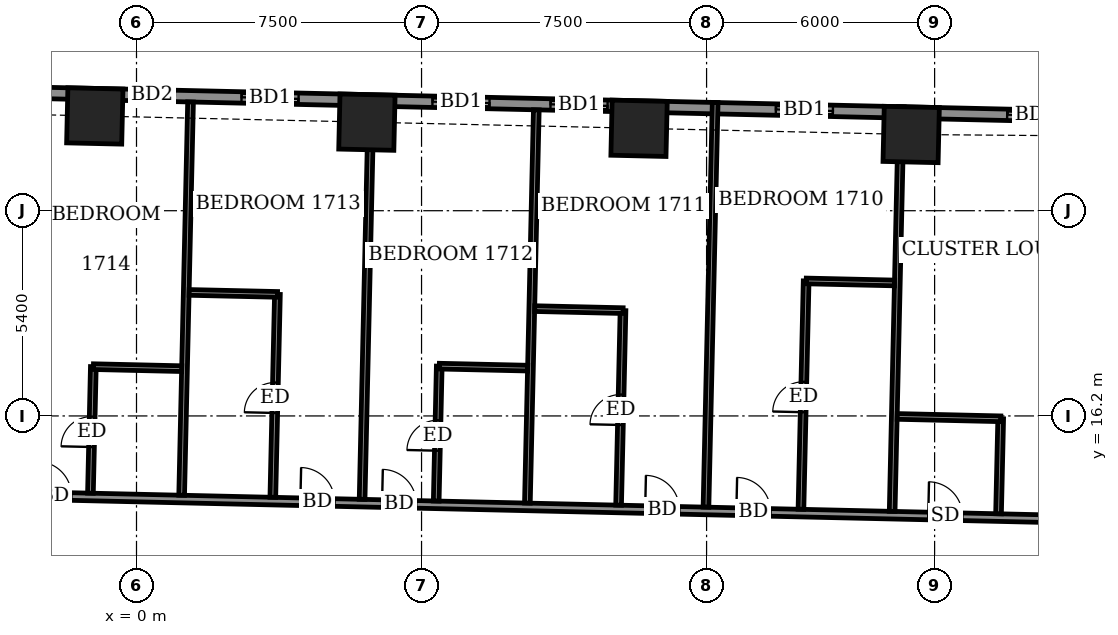
"""IFC4 building model, lengths in metres.
Left out: names, types, materials, properties, quantities, classifications, styles, units other than length and angle.
Written with IfcOpenShell. Run it as: python <this file> out.ifc"""

import sys

from ifc_helpers import new_model, si_unit, direction, frame, frame_2d, origin, origin_2d, place, context, subcontext, project, spatial, rectangle, extrude, element, fill, save


model = new_model("IFC4")
c1 = context("Model", 3, precision=1e-05, world=origin(), true_north=direction((0.0, 1.0)))
c2 = subcontext(c1, "Body", "Model", "MODEL_VIEW")
j1 = project(units=[si_unit("LENGTHUNIT", "METRE"), si_unit("PLANEANGLEUNIT", "RADIAN")], contexts=[c1])
p1 = place(None, origin())
s1 = spatial("IfcSite", under=j1, at=p1, CompositionType="ELEMENT")
p2 = place(p1, origin())
s2 = spatial("IfcBuilding", under=s1, at=p2, CompositionType="ELEMENT")
p3 = place(p2, frame((0.0, 0.0, 71.1)))
s3 = spatial("IfcBuildingStorey", under=s2, at=p3, CompositionType="ELEMENT", Elevation=71.1)
for number, where, z_axis, x_axis in (
    (1, (20.384, 23.605, -0.55), (0.0, 0.0, 1.0), (-1.0, 0.023, 0.0)),
    (2, (13.224, 23.768, -0.55), (0.0, 0.0, 1.0), (-1.0, 0.023, 0.0)),
    (3, (6.062, 23.93, -0.55), (0.0, 0.0, 1.0), (-1.0, 0.023, 0.0)),
    (4, (-1.097, 24.093, -0.55), (0.0, 0.0, 1.0), (-1.0, 0.023, 0.0)),
):
    element("IfcColumn", number, at=place(p3, frame(where, z_axis=z_axis, x_axis=x_axis)), inside=s3, PredefinedType="COLUMN", context=c2, shape_type="SweptSolid", body=[
        extrude(rectangle(XDim=1.45, YDim=1.45, at=origin_2d()), origin(), (0.0, 0.0, 1.0), 3.6),
    ])
p4 = place(p3, frame((27.407, 24.021, 0.0), z_axis=(0.0, 0.0, 1.0), x_axis=(-0.99974239923, 0.022696589664, 0.0)))
e5 = element("IfcWall", 5, at=p4, inside=s3, PredefinedType="SOLIDWALL", context=c2, shape_type="SweptSolid", body=[
    extrude(rectangle(XDim=49.836, YDim=0.3, at=frame_2d((24.918, 0.0))), origin(), (0.0, 0.0, 1.0), 3.05),
])
p5 = place(p4, frame((2.998, 0.0, 0.0)))
e6 = element("IfcOpeningElement", 6, at=p5, cuts=e5, PredefinedType="OPENING", context=c2, shape_type="SweptSolid", body=[
    extrude(rectangle(XDim=1.5, YDim=2.4, at=frame_2d((0.75, 1.2))), frame((0.0, 0.16, 0.0), z_axis=(0.0, -1.0, 0.0), x_axis=(1.0, 0.0, 0.0)), (0.0, 0.0, 1.0), 0.32),
])
p6 = place(p4, frame((9.086, 0.0, 0.0)))
e7 = element("IfcOpeningElement", 7, at=p6, cuts=e5, PredefinedType="OPENING", context=c2, shape_type="SweptSolid", body=[
    extrude(rectangle(XDim=1.5, YDim=2.4, at=frame_2d((0.75, 1.2))), frame((0.0, 0.16, 0.0), z_axis=(0.0, -1.0, 0.0), x_axis=(1.0, 0.0, 0.0)), (0.0, 0.0, 1.0), 0.32),
])
p7 = place(p4, frame((15.017, 0.0, 0.0)))
e8 = element("IfcOpeningElement", 8, at=p7, cuts=e5, PredefinedType="OPENING", context=c2, shape_type="SweptSolid", body=[
    extrude(rectangle(XDim=1.5, YDim=2.4, at=frame_2d((0.75, 1.2))), frame((0.0, 0.16, 0.0), z_axis=(0.0, -1.0, 0.0), x_axis=(1.0, 0.0, 0.0)), (0.0, 0.0, 1.0), 0.32),
])
p8 = place(p4, frame((18.124, 0.0, 0.0)))
e9 = element("IfcOpeningElement", 9, at=p8, cuts=e5, PredefinedType="OPENING", context=c2, shape_type="SweptSolid", body=[
    extrude(rectangle(XDim=1.5, YDim=2.4, at=frame_2d((0.75, 1.2))), frame((0.0, 0.16, 0.0), z_axis=(0.0, -1.0, 0.0), x_axis=(1.0, 0.0, 0.0)), (0.0, 0.0, 1.0), 0.32),
])
p9 = place(p4, frame((23.149, 0.0, 0.0)))
e10 = element("IfcOpeningElement", 10, at=p9, cuts=e5, PredefinedType="OPENING", context=c2, shape_type="SweptSolid", body=[
    extrude(rectangle(XDim=1.5, YDim=2.4, at=frame_2d((0.75, 1.2))), frame((0.0, 0.16, 0.0), z_axis=(0.0, -1.0, 0.0), x_axis=(1.0, 0.0, 0.0)), (0.0, 0.0, 1.0), 0.32),
])
p10 = place(p4, frame((26.405, 0.0, 0.0)))
e11 = element("IfcOpeningElement", 11, at=p10, cuts=e5, PredefinedType="OPENING", context=c2, shape_type="SweptSolid", body=[
    extrude(rectangle(XDim=1.2, YDim=2.4, at=frame_2d((0.6, 1.2))), frame((0.0, 0.16, 0.0), z_axis=(0.0, -1.0, 0.0), x_axis=(1.0, 0.0, 0.0)), (0.0, 0.0, 1.0), 0.32),
])
p11 = place(p4, frame((31.986, 0.0, 0.0)))
e12 = element("IfcOpeningElement", 12, at=p11, cuts=e5, PredefinedType="OPENING", context=c2, shape_type="SweptSolid", body=[
    extrude(rectangle(XDim=1.5, YDim=2.4, at=frame_2d((0.75, 1.2))), frame((0.0, 0.16, 0.0), z_axis=(0.0, -1.0, 0.0), x_axis=(1.0, 0.0, 0.0)), (0.0, 0.0, 1.0), 0.32),
])
p12 = place(p4, frame((37.211, 0.0, 0.0)))
e13 = element("IfcOpeningElement", 13, at=p12, cuts=e5, PredefinedType="OPENING", context=c2, shape_type="SweptSolid", body=[
    extrude(rectangle(XDim=1.5, YDim=2.4, at=frame_2d((0.75, 1.2))), frame((0.0, 0.16, 0.0), z_axis=(0.0, -1.0, 0.0), x_axis=(1.0, 0.0, 0.0)), (0.0, 0.0, 1.0), 0.32),
])
p13 = place(p4, frame((40.317, 0.0, 0.0)))
e14 = element("IfcOpeningElement", 14, at=p13, cuts=e5, PredefinedType="OPENING", context=c2, shape_type="SweptSolid", body=[
    extrude(rectangle(XDim=1.5, YDim=2.4, at=frame_2d((0.75, 1.2))), frame((0.0, 0.16, 0.0), z_axis=(0.0, -1.0, 0.0), x_axis=(1.0, 0.0, 0.0)), (0.0, 0.0, 1.0), 0.32),
])
p14 = place(p4, frame((45.431, 0.0, 0.9)))
e15 = element("IfcOpeningElement", 15, at=p14, cuts=e5, PredefinedType="OPENING", context=c2, shape_type="SweptSolid", body=[
    extrude(rectangle(XDim=2.4, YDim=1.5, at=frame_2d((1.2, 0.75))), frame((0.0, 0.16, 0.0), z_axis=(0.0, -1.0, 0.0), x_axis=(1.0, 0.0, 0.0)), (0.0, 0.0, 1.0), 0.32),
])
p15 = place(p3, frame((-25.481, 14.619, 0.0), z_axis=(0.0, 0.0, 1.0), x_axis=(0.999742349682, -0.022698772048, 0.0)))
e16 = element("IfcWall", 16, at=p15, inside=s3, PredefinedType="PARTITIONING", context=c2, shape_type="SweptSolid", body=[
    extrude(rectangle(XDim=54.886, YDim=0.2, at=frame_2d((27.443, 0.0))), origin(), (0.0, 0.0, 1.0), 3.05),
])
p16 = place(p15, frame((52.093, 0.0, 0.0)))
e17 = element("IfcOpeningElement", 17, at=p16, cuts=e16, PredefinedType="OPENING", context=c2, shape_type="SweptSolid", body=[
    extrude(rectangle(XDim=1.0, YDim=2.1, at=frame_2d((0.5, 1.05))), frame((0.0, 0.11, 0.0), z_axis=(0.0, -1.0, 0.0), x_axis=(1.0, 0.0, 0.0)), (0.0, 0.0, 1.0), 0.22),
])
p17 = place(p15, frame((46.325, 0.0, 0.0)))
e18 = element("IfcOpeningElement", 18, at=p17, cuts=e16, PredefinedType="OPENING", context=c2, shape_type="SweptSolid", body=[
    extrude(rectangle(XDim=0.9, YDim=2.1, at=frame_2d((0.45, 1.05))), frame((0.0, 0.11, 0.0), z_axis=(0.0, -1.0, 0.0), x_axis=(1.0, 0.0, 0.0)), (0.0, 0.0, 1.0), 0.22),
])
p18 = place(p15, frame((41.275, 0.0, 0.0)))
e19 = element("IfcOpeningElement", 19, at=p18, cuts=e16, PredefinedType="OPENING", context=c2, shape_type="SweptSolid", body=[
    extrude(rectangle(XDim=0.9, YDim=2.1, at=frame_2d((0.45, 1.05))), frame((0.0, 0.11, 0.0), z_axis=(0.0, -1.0, 0.0), x_axis=(1.0, 0.0, 0.0)), (0.0, 0.0, 1.0), 0.22),
])
p19 = place(p15, frame((38.875, 0.0, 0.0)))
e20 = element("IfcOpeningElement", 20, at=p19, cuts=e16, PredefinedType="OPENING", context=c2, shape_type="SweptSolid", body=[
    extrude(rectangle(XDim=0.9, YDim=2.1, at=frame_2d((0.45, 1.05))), frame((0.0, 0.11, 0.0), z_axis=(0.0, -1.0, 0.0), x_axis=(1.0, 0.0, 0.0)), (0.0, 0.0, 1.0), 0.22),
])
p20 = place(p15, frame((31.95, 0.0, 0.0)))
e21 = element("IfcOpeningElement", 21, at=p20, cuts=e16, PredefinedType="OPENING", context=c2, shape_type="SweptSolid", body=[
    extrude(rectangle(XDim=0.9, YDim=2.1, at=frame_2d((0.45, 1.05))), frame((0.0, 0.11, 0.0), z_axis=(0.0, -1.0, 0.0), x_axis=(1.0, 0.0, 0.0)), (0.0, 0.0, 1.0), 0.22),
])
p21 = place(p15, frame((29.8, 0.0, 0.0)))
e22 = element("IfcOpeningElement", 22, at=p21, cuts=e16, PredefinedType="OPENING", context=c2, shape_type="SweptSolid", body=[
    extrude(rectangle(XDim=0.9, YDim=2.1, at=frame_2d((0.45, 1.05))), frame((0.0, 0.11, 0.0), z_axis=(0.0, -1.0, 0.0), x_axis=(1.0, 0.0, 0.0)), (0.0, 0.0, 1.0), 0.22),
])
p22 = place(p15, frame((22.875, 0.0, 0.0)))
e23 = element("IfcOpeningElement", 23, at=p22, cuts=e16, PredefinedType="OPENING", context=c2, shape_type="SweptSolid", body=[
    extrude(rectangle(XDim=0.9, YDim=2.1, at=frame_2d((0.45, 1.05))), frame((0.0, 0.11, 0.0), z_axis=(0.0, -1.0, 0.0), x_axis=(1.0, 0.0, 0.0)), (0.0, 0.0, 1.0), 0.22),
])
p23 = place(p15, frame((20.675, 0.0, 0.0)))
e24 = element("IfcOpeningElement", 24, at=p23, cuts=e16, PredefinedType="OPENING", context=c2, shape_type="SweptSolid", body=[
    extrude(rectangle(XDim=0.9, YDim=2.1, at=frame_2d((0.45, 1.05))), frame((0.0, 0.11, 0.0), z_axis=(0.0, -1.0, 0.0), x_axis=(1.0, 0.0, 0.0)), (0.0, 0.0, 1.0), 0.22),
])
p24 = place(p15, frame((13.525, 0.0, 0.0)))
e25 = element("IfcOpeningElement", 25, at=p24, cuts=e16, PredefinedType="OPENING", context=c2, shape_type="SweptSolid", body=[
    extrude(rectangle(XDim=0.9, YDim=2.1, at=frame_2d((0.45, 1.05))), frame((0.0, 0.11, 0.0), z_axis=(0.0, -1.0, 0.0), x_axis=(1.0, 0.0, 0.0)), (0.0, 0.0, 1.0), 0.22),
])
p25 = place(p15, frame((11.275, 0.0, 0.0)))
e26 = element("IfcOpeningElement", 26, at=p25, cuts=e16, PredefinedType="OPENING", context=c2, shape_type="SweptSolid", body=[
    extrude(rectangle(XDim=0.9, YDim=2.1, at=frame_2d((0.45, 1.05))), frame((0.0, 0.11, 0.0), z_axis=(0.0, -1.0, 0.0), x_axis=(1.0, 0.0, 0.0)), (0.0, 0.0, 1.0), 0.22),
])
p26 = place(p15, frame((3.079, 0.0, 0.0)))
e27 = element("IfcOpeningElement", 27, at=p26, cuts=e16, PredefinedType="OPENING", context=c2, shape_type="SweptSolid", body=[
    extrude(rectangle(XDim=1.0, YDim=2.1, at=frame_2d((0.5, 1.05))), frame((0.0, 0.11, 0.0), z_axis=(0.0, -1.0, 0.0), x_axis=(1.0, 0.0, 0.0)), (0.0, 0.0, 1.0), 0.22),
])
p27 = place(p3, frame((-1.212, 14.168, 0.0), z_axis=(0.0, 0.0, 1.0), x_axis=(0.022801345323, 0.99974001553, 0.0)))
e28 = element("IfcWall", 28, at=p27, inside=s3, PredefinedType="PARTITIONING", context=c2, shape_type="SweptSolid", body=[
    extrude(rectangle(XDim=3.33, YDim=0.15, at=frame_2d((1.665, 0.0))), origin(), (0.0, 0.0, 1.0), 3.05),
])
p28 = place(p27, frame((1.215, 0.0, 0.0)))
e29 = element("IfcOpeningElement", 29, at=p28, cuts=e28, PredefinedType="OPENING", context=c2, shape_type="SweptSolid", body=[
    extrude(rectangle(XDim=0.8, YDim=2.1, at=frame_2d((0.4, 1.05))), frame((0.0, 0.085, 0.0), z_axis=(0.0, -1.0, 0.0), x_axis=(1.0, 0.0, 0.0)), (0.0, 0.0, 1.0), 0.17),
])
p29 = place(p3, frame((1.188, 14.113, 0.0), z_axis=(0.0, 0.0, 1.0), x_axis=(0.022620139731, 0.999744131905, 0.0)))
e30 = element("IfcWall", 30, at=p29, inside=s3, PredefinedType="PARTITIONING", context=c2, shape_type="SweptSolid", body=[
    extrude(rectangle(XDim=10.351, YDim=0.15, at=frame_2d((5.175, 0.0))), origin(), (0.0, 0.0, 1.0), 2.55),
])
p30 = place(p3, frame((3.587, 14.059, 0.0), z_axis=(0.0, 0.0, 1.0), x_axis=(0.022675711771, 0.999742872991, 0.0)))
e31 = element("IfcWall", 31, at=p30, inside=s3, PredefinedType="PARTITIONING", context=c2, shape_type="SweptSolid", body=[
    extrude(rectangle(XDim=5.34, YDim=0.15, at=frame_2d((2.67, 0.0))), origin(), (0.0, 0.0, 1.0), 3.05),
])
p31 = place(p30, frame((2.22, 0.0, 0.0)))
e32 = element("IfcOpeningElement", 32, at=p31, cuts=e31, PredefinedType="OPENING", context=c2, shape_type="SweptSolid", body=[
    extrude(rectangle(XDim=0.8, YDim=2.1, at=frame_2d((0.4, 1.05))), frame((0.0, 0.085, 0.0), z_axis=(0.0, -1.0, 0.0), x_axis=(1.0, 0.0, 0.0)), (0.0, 0.0, 1.0), 0.17),
])
p32 = place(p3, frame((5.936, 14.006, 0.0), z_axis=(0.0, 0.0, 1.0), x_axis=(0.022693005506, 0.999742480592, 0.0)))
e33 = element("IfcWall", 33, at=p32, inside=s3, PredefinedType="PARTITIONING", context=c2, shape_type="SweptSolid", body=[
    extrude(rectangle(XDim=10.35, YDim=0.15, at=frame_2d((5.175, 0.0))), origin(), (0.0, 0.0, 1.0), 3.05),
])
p33 = place(p3, frame((7.886, 13.961, 0.0), z_axis=(0.0, 0.0, 1.0), x_axis=(0.022557373628, 0.999745550075, 0.0)))
e34 = element("IfcWall", 34, at=p33, inside=s3, PredefinedType="PARTITIONING", context=c2, shape_type="SweptSolid", body=[
    extrude(rectangle(XDim=3.55, YDim=0.15, at=frame_2d((1.775, 0.0))), origin(), (0.0, 0.0, 1.0), 3.05),
])
p34 = place(p33, frame((1.325, 0.0, 0.0)))
e35 = element("IfcOpeningElement", 35, at=p34, cuts=e34, PredefinedType="OPENING", context=c2, shape_type="SweptSolid", body=[
    extrude(rectangle(XDim=0.8, YDim=2.1, at=frame_2d((0.4, 1.05))), frame((0.0, 0.085, 0.0), z_axis=(0.0, -1.0, 0.0), x_axis=(1.0, 0.0, 0.0)), (0.0, 0.0, 1.0), 0.17),
])
p35 = place(p3, frame((10.285, 13.907, 0.0), z_axis=(0.0, 0.0, 1.0), x_axis=(0.022716582742, 0.999741945138, 0.0)))
e36 = element("IfcWall", 36, at=p35, inside=s3, PredefinedType="PARTITIONING", context=c2, shape_type="SweptSolid", body=[
    extrude(rectangle(XDim=10.35, YDim=0.15, at=frame_2d((5.175, 0.0))), origin(), (0.0, 0.0, 1.0), 2.55),
])
p36 = place(p3, frame((12.685, 13.853, 0.0), z_axis=(0.0, 0.0, 1.0), x_axis=(0.02265315592, 0.999743384338, 0.0)))
e37 = element("IfcWall", 37, at=p36, inside=s3, PredefinedType="PARTITIONING", context=c2, shape_type="SweptSolid", body=[
    extrude(rectangle(XDim=5.119, YDim=0.15, at=frame_2d((2.56, 0.0))), origin(), (0.0, 0.0, 1.0), 3.05),
])
p37 = place(p36, frame((2.11, 0.0, 0.0)))
e38 = element("IfcOpeningElement", 38, at=p37, cuts=e37, PredefinedType="OPENING", context=c2, shape_type="SweptSolid", body=[
    extrude(rectangle(XDim=0.8, YDim=2.1, at=frame_2d((0.4, 1.05))), frame((0.0, 0.085, 0.0), z_axis=(0.0, -1.0, 0.0), x_axis=(1.0, 0.0, 0.0)), (0.0, 0.0, 1.0), 0.17),
])
p38 = place(p3, frame((14.984, 13.8, 0.0), z_axis=(0.0, 0.0, 1.0), x_axis=(0.022739109038, 0.999741433032, 0.0)))
e39 = element("IfcWall", 39, at=p38, inside=s3, PredefinedType="PARTITIONING", context=c2, shape_type="SweptSolid", body=[
    extrude(rectangle(XDim=10.651, YDim=0.15, at=frame_2d((5.325, 0.0))), origin(), (0.0, 0.0, 1.0), 2.55),
])
p39 = place(p3, frame((17.483, 13.744, 0.0), z_axis=(0.0, 0.0, 1.0), x_axis=(0.022831220511, 0.999739333712, 0.0)))
e40 = element("IfcWall", 40, at=p39, inside=s3, PredefinedType="PARTITIONING", context=c2, shape_type="SweptSolid", body=[
    extrude(rectangle(XDim=6.01, YDim=0.15, at=frame_2d((3.005, 0.0))), origin(), (0.0, 0.0, 1.0), 3.05),
])
p40 = place(p39, frame((2.555, 0.0, 0.0)))
e41 = element("IfcOpeningElement", 41, at=p40, cuts=e40, PredefinedType="OPENING", context=c2, shape_type="SweptSolid", body=[
    extrude(rectangle(XDim=0.8, YDim=2.1, at=frame_2d((0.4, 1.05))), frame((0.0, 0.085, 0.0), z_axis=(0.0, -1.0, 0.0), x_axis=(1.0, 0.0, 0.0)), (0.0, 0.0, 1.0), 0.17),
])
p41 = place(p3, frame((19.883, 13.689, 0.0), z_axis=(0.0, 0.0, 1.0), x_axis=(0.022626629517, 0.999743985047, 0.0)))
e42 = element("IfcWall", 42, at=p41, inside=s3, PredefinedType="PARTITIONING", context=c2, shape_type="SweptSolid", body=[
    extrude(rectangle(XDim=10.65, YDim=0.15, at=frame_2d((5.325, 0.0))), origin(), (0.0, 0.0, 1.0), 3.05),
])
p42 = place(p3, frame((22.682, 13.626, 0.0), z_axis=(0.0, 0.0, 1.0), x_axis=(0.022854521249, 0.999738801317, 0.0)))
e43 = element("IfcWall", 43, at=p42, inside=s3, PredefinedType="PARTITIONING", context=c2, shape_type="SweptSolid", body=[
    extrude(rectangle(XDim=2.5, YDim=0.15, at=frame_2d((1.25, 0.0))), origin(), (0.0, 0.0, 1.0), 3.05),
])
p43 = place(p3, frame((20.016, 16.187, 0.0), z_axis=(0.0, 0.0, 1.0), x_axis=(0.99974114142, -0.022751926344, 0.0)))
e44 = element("IfcWall", 44, at=p43, inside=s3, PredefinedType="PARTITIONING", context=c2, shape_type="SweptSolid", body=[
    extrude(rectangle(XDim=2.726, YDim=0.15, at=frame_2d((1.363, 0.0))), origin(), (0.0, 0.0, 1.0), 3.05),
])
p44 = place(p3, frame((-1.134, 17.497, 0.0), z_axis=(0.0, 0.0, 1.0), x_axis=(0.999740260747, -0.02279059109, 0.0)))
e45 = element("IfcWall", 45, at=p44, inside=s3, PredefinedType="PARTITIONING", context=c2, shape_type="SweptSolid", body=[
    extrude(rectangle(XDim=2.324, YDim=0.15, at=frame_2d((1.162, 0.0))), origin(), (0.0, 0.0, 1.0), 3.05),
])
for number, where, z_axis, x_axis in (
    (46, (7.968, 17.51, 0.0), (0.0, 0.0, 1.0), (1.0, -0.022, 0.0)),
    (47, (10.478, 19.024, 0.0), (0.0, 0.0, 1.0), (1.0, -0.023, 0.0)),
):
    element("IfcWall", number, at=place(p3, frame(where, z_axis=z_axis, x_axis=x_axis)), inside=s3, PredefinedType="PARTITIONING", context=c2, shape_type="SweptSolid", body=[
        extrude(rectangle(XDim=2.325, YDim=0.15, at=frame_2d((1.163, 0.0))), origin(), (0.0, 0.0, 1.0), 3.05),
    ])
for number, where, z_axis, x_axis in (
    (48, (1.386, 19.45, 0.0), (0.0, 0.0, 1.0), (1.0, -0.022, 0.0)),
    (49, (17.622, 19.752, 0.0), (0.0, 0.0, 1.0), (1.0, -0.023, 0.0)),
):
    element("IfcWall", number, at=place(p3, frame(where, z_axis=z_axis, x_axis=x_axis)), inside=s3, PredefinedType="PARTITIONING", context=c2, shape_type="SweptSolid", body=[
        extrude(rectangle(XDim=2.324, YDim=0.15, at=frame_2d((1.162, 0.0))), origin(), (0.0, 0.0, 1.0), 3.05),
    ])
p45 = place(p5, origin())
e50 = element("IfcDoor", 50, at=p45, inside=s3, OperationType="SLIDING_TO_LEFT", PredefinedType="DOOR", context=c2, shape_type="SweptSolid", body=[
    extrude(rectangle(XDim=1.5, YDim=2.4, at=frame_2d((0.75, 1.2))), frame((0.0, 0.025, 0.0), z_axis=(0.0, -1.0, 0.0), x_axis=(1.0, 0.0, 0.0)), (0.0, 0.0, 1.0), 0.05),
])
fill(e6, e50)
p46 = place(p6, origin())
e51 = element("IfcDoor", 51, at=p46, inside=s3, OperationType="SLIDING_TO_LEFT", PredefinedType="DOOR", context=c2, shape_type="SweptSolid", body=[
    extrude(rectangle(XDim=1.5, YDim=2.4, at=frame_2d((0.75, 1.2))), frame((0.0, 0.025, 0.0), z_axis=(0.0, -1.0, 0.0), x_axis=(1.0, 0.0, 0.0)), (0.0, 0.0, 1.0), 0.05),
])
fill(e7, e51)
p47 = place(p7, origin())
e52 = element("IfcDoor", 52, at=p47, inside=s3, OperationType="SLIDING_TO_LEFT", PredefinedType="DOOR", context=c2, shape_type="SweptSolid", body=[
    extrude(rectangle(XDim=1.5, YDim=2.4, at=frame_2d((0.75, 1.2))), frame((0.0, 0.025, 0.0), z_axis=(0.0, -1.0, 0.0), x_axis=(1.0, 0.0, 0.0)), (0.0, 0.0, 1.0), 0.05),
])
fill(e8, e52)
p48 = place(p8, origin())
e53 = element("IfcDoor", 53, at=p48, inside=s3, OperationType="SLIDING_TO_LEFT", PredefinedType="DOOR", context=c2, shape_type="SweptSolid", body=[
    extrude(rectangle(XDim=1.5, YDim=2.4, at=frame_2d((0.75, 1.2))), frame((0.0, 0.025, 0.0), z_axis=(0.0, -1.0, 0.0), x_axis=(1.0, 0.0, 0.0)), (0.0, 0.0, 1.0), 0.05),
])
fill(e9, e53)
p49 = place(p9, origin())
e54 = element("IfcDoor", 54, at=p49, inside=s3, OperationType="SLIDING_TO_LEFT", PredefinedType="DOOR", context=c2, shape_type="SweptSolid", body=[
    extrude(rectangle(XDim=1.5, YDim=2.4, at=frame_2d((0.75, 1.2))), frame((0.0, 0.025, 0.0), z_axis=(0.0, -1.0, 0.0), x_axis=(1.0, 0.0, 0.0)), (0.0, 0.0, 1.0), 0.05),
])
fill(e10, e54)
p50 = place(p10, origin())
e55 = element("IfcDoor", 55, at=p50, inside=s3, OperationType="SLIDING_TO_LEFT", PredefinedType="DOOR", context=c2, shape_type="SweptSolid", body=[
    extrude(rectangle(XDim=1.2, YDim=2.4, at=frame_2d((0.6, 1.2))), frame((0.0, 0.025, 0.0), z_axis=(0.0, -1.0, 0.0), x_axis=(1.0, 0.0, 0.0)), (0.0, 0.0, 1.0), 0.05),
])
fill(e11, e55)
p51 = place(p17, origin())
e56 = element("IfcDoor", 56, at=p51, inside=s3, OperationType="SINGLE_SWING_RIGHT", PredefinedType="DOOR", context=c2, shape_type="SweptSolid", body=[
    extrude(rectangle(XDim=0.9, YDim=2.1, at=frame_2d((0.45, 1.05))), frame((0.0, 0.025, 0.0), z_axis=(0.0, -1.0, 0.0), x_axis=(1.0, 0.0, 0.0)), (0.0, 0.0, 1.0), 0.05),
])
fill(e18, e56)
p52 = place(p18, origin())
e57 = element("IfcDoor", 57, at=p52, inside=s3, OperationType="SINGLE_SWING_RIGHT", PredefinedType="DOOR", context=c2, shape_type="SweptSolid", body=[
    extrude(rectangle(XDim=0.9, YDim=2.1, at=frame_2d((0.45, 1.05))), frame((0.0, 0.025, 0.0), z_axis=(0.0, -1.0, 0.0), x_axis=(1.0, 0.0, 0.0)), (0.0, 0.0, 1.0), 0.05),
])
fill(e19, e57)
p53 = place(p40, origin())
e58 = element("IfcDoor", 58, at=p53, inside=s3, OperationType="SINGLE_SWING_RIGHT", PredefinedType="DOOR", context=c2, shape_type="SweptSolid", body=[
    extrude(rectangle(XDim=0.8, YDim=2.1, at=frame_2d((0.4, 1.05))), frame((0.0, 0.025, 0.0), z_axis=(0.0, -1.0, 0.0), x_axis=(1.0, 0.0, 0.0)), (0.0, 0.0, 1.0), 0.05),
])
fill(e41, e58)
p54 = place(p19, origin())
e59 = element("IfcDoor", 59, at=p54, inside=s3, OperationType="SINGLE_SWING_LEFT", PredefinedType="DOOR", context=c2, shape_type="SweptSolid", body=[
    extrude(rectangle(XDim=0.9, YDim=2.1, at=frame_2d((0.45, 1.05))), frame((0.0, 0.025, 0.0), z_axis=(0.0, -1.0, 0.0), x_axis=(1.0, 0.0, 0.0)), (0.0, 0.0, 1.0), 0.05),
])
fill(e20, e59)
p55 = place(p37, origin())
e60 = element("IfcDoor", 60, at=p55, inside=s3, OperationType="SINGLE_SWING_LEFT", PredefinedType="DOOR", context=c2, shape_type="SweptSolid", body=[
    extrude(rectangle(XDim=0.8, YDim=2.1, at=frame_2d((0.4, 1.05))), frame((0.0, 0.025, 0.0), z_axis=(0.0, -1.0, 0.0), x_axis=(1.0, 0.0, 0.0)), (0.0, 0.0, 1.0), 0.05),
])
fill(e38, e60)
p56 = place(p20, origin())
e61 = element("IfcDoor", 61, at=p56, inside=s3, OperationType="SINGLE_SWING_RIGHT", PredefinedType="DOOR", context=c2, shape_type="SweptSolid", body=[
    extrude(rectangle(XDim=0.9, YDim=2.1, at=frame_2d((0.45, 1.05))), frame((0.0, 0.025, 0.0), z_axis=(0.0, -1.0, 0.0), x_axis=(1.0, 0.0, 0.0)), (0.0, 0.0, 1.0), 0.05),
])
fill(e21, e61)
p57 = place(p34, origin())
e62 = element("IfcDoor", 62, at=p57, inside=s3, OperationType="SINGLE_SWING_RIGHT", PredefinedType="DOOR", context=c2, shape_type="SweptSolid", body=[
    extrude(rectangle(XDim=0.8, YDim=2.1, at=frame_2d((0.4, 1.05))), frame((0.0, 0.025, 0.0), z_axis=(0.0, -1.0, 0.0), x_axis=(1.0, 0.0, 0.0)), (0.0, 0.0, 1.0), 0.05),
])
fill(e35, e62)
p58 = place(p21, origin())
e63 = element("IfcDoor", 63, at=p58, inside=s3, OperationType="SINGLE_SWING_LEFT", PredefinedType="DOOR", context=c2, shape_type="SweptSolid", body=[
    extrude(rectangle(XDim=0.9, YDim=2.1, at=frame_2d((0.45, 1.05))), frame((0.0, 0.025, 0.0), z_axis=(0.0, -1.0, 0.0), x_axis=(1.0, 0.0, 0.0)), (0.0, 0.0, 1.0), 0.05),
])
fill(e22, e63)
p59 = place(p31, origin())
e64 = element("IfcDoor", 64, at=p59, inside=s3, OperationType="SINGLE_SWING_LEFT", PredefinedType="DOOR", context=c2, shape_type="SweptSolid", body=[
    extrude(rectangle(XDim=0.8, YDim=2.1, at=frame_2d((0.4, 1.05))), frame((0.0, 0.025, 0.0), z_axis=(0.0, -1.0, 0.0), x_axis=(1.0, 0.0, 0.0)), (0.0, 0.0, 1.0), 0.05),
])
fill(e32, e64)
p60 = place(p22, origin())
e65 = element("IfcDoor", 65, at=p60, inside=s3, OperationType="SINGLE_SWING_RIGHT", PredefinedType="DOOR", context=c2, shape_type="SweptSolid", body=[
    extrude(rectangle(XDim=0.9, YDim=2.1, at=frame_2d((0.45, 1.05))), frame((0.0, 0.025, 0.0), z_axis=(0.0, -1.0, 0.0), x_axis=(1.0, 0.0, 0.0)), (0.0, 0.0, 1.0), 0.05),
])
fill(e23, e65)
p61 = place(p28, origin())
e66 = element("IfcDoor", 66, at=p61, inside=s3, OperationType="SINGLE_SWING_RIGHT", PredefinedType="DOOR", context=c2, shape_type="SweptSolid", body=[
    extrude(rectangle(XDim=0.8, YDim=2.1, at=frame_2d((0.4, 1.05))), frame((0.0, 0.025, 0.0), z_axis=(0.0, -1.0, 0.0), x_axis=(1.0, 0.0, 0.0)), (0.0, 0.0, 1.0), 0.05),
])
fill(e29, e66)
save(model, sys.argv[1])
